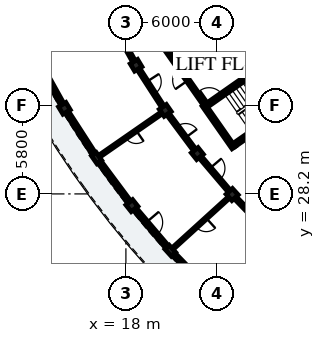
"""IFC4 building model, lengths in metres.
Left out: names, types, materials, properties, quantities, classifications, styles, units other than length and angle.
Written with IfcOpenShell. Run it as: python <this file> out.ifc"""

import sys

from ifc_helpers import new_model, si_unit, direction, frame, frame_2d, origin, origin_2d, place, context, subcontext, project, spatial, rectangle, extrude, element, fill, save


model = new_model("IFC4")
c1 = context("Model", 3, precision=1e-05, world=origin(), true_north=direction((0.0, 1.0)))
c2 = subcontext(c1, "Body", "Model", "MODEL_VIEW")
j1 = project(units=[si_unit("LENGTHUNIT", "METRE"), si_unit("PLANEANGLEUNIT", "RADIAN")], contexts=[c1])
p1 = place(None, origin())
s1 = spatial("IfcSite", under=j1, at=p1, CompositionType="ELEMENT")
p2 = place(p1, origin())
s2 = spatial("IfcBuilding", under=s1, at=p2, CompositionType="ELEMENT")
p3 = place(p2, frame((0.0, 0.0, 15.56)))
s3 = spatial("IfcBuildingStorey", under=s2, at=p3, CompositionType="ELEMENT", Elevation=15.56)
p4 = place(p3, frame((25.114, 31.414, 0.0), z_axis=(0.0, 0.0, 1.0), x_axis=(0.819141541656, 0.573591435374, 0.0)))
e1 = element("IfcWall", 1, at=p4, inside=s3, PredefinedType="SHEAR", context=c2, shape_type="SweptSolid", body=[
    extrude(rectangle(XDim=6.6, YDim=0.25, at=frame_2d((3.3, 0.0))), origin(), (0.0, 0.0, 1.0), 3.11),
])
p5 = place(p3, frame((25.083, 31.24, 0.0), z_axis=(0.0, 0.0, 1.0), x_axis=(-0.573582112484, 0.819148069789, 0.0)))
e2 = element("IfcWall", 2, at=p5, inside=s3, PredefinedType="SHEAR", context=c2, shape_type="SweptSolid", body=[
    extrude(rectangle(XDim=3.42, YDim=0.25, at=frame_2d((1.71, 0.0))), origin(), (0.0, 0.0, 1.0), 3.11),
])
p6 = place(p3, frame((23.296, 34.01, 0.0), z_axis=(0.0, 0.0, 1.0), x_axis=(0.819153711596, 0.573574055182, 0.0)))
e3 = element("IfcWall", 3, at=p6, inside=s3, PredefinedType="SHEAR", context=c2, shape_type="SweptSolid", body=[
    extrude(rectangle(XDim=6.6, YDim=0.25, at=frame_2d((3.3, 0.0))), origin(), (0.0, 0.0, 1.0), 3.11),
])
p7 = place(p6, frame((0.22, 0.0, 0.0)))
e4 = element("IfcOpeningElement", 4, at=p7, cuts=e3, PredefinedType="OPENING", context=c2, shape_type="SweptSolid", body=[
    extrude(rectangle(XDim=1.05, YDim=2.15, at=frame_2d((0.525, 1.075))), frame((0.0, 0.135, 0.0), z_axis=(0.0, -1.0, 0.0), x_axis=(1.0, 0.0, 0.0)), (0.0, 0.0, 1.0), 0.27),
])
p8 = place(p3, frame((26.169, 36.419, 0.0), z_axis=(0.0, 0.0, 1.0), x_axis=(-0.573582966431, 0.819147471839, 0.0)))
e5 = element("IfcWall", 5, at=p8, inside=s3, PredefinedType="SHEAR", context=c2, shape_type="SweptSolid", body=[
    extrude(rectangle(XDim=3.26, YDim=0.23, at=frame_2d((1.63, 0.0))), origin(), (0.0, 0.0, 1.0), 3.11),
])
p9 = place(p8, frame((0.9, 0.0, 0.0)))
e6 = element("IfcOpeningElement", 6, at=p9, cuts=e5, PredefinedType="OPENING", context=c2, shape_type="SweptSolid", body=[
    extrude(rectangle(XDim=1.1, YDim=2.15, at=frame_2d((0.55, 1.075))), frame((0.0, 0.125, 0.0), z_axis=(0.0, -1.0, 0.0), x_axis=(1.0, 0.0, 0.0)), (0.0, 0.0, 1.0), 0.25),
])
for number, where, z_axis, x_axis in (
    (7, (18.67, 36.662, 0.0), (0.0, 0.0, 1.0), (-0.857, -0.515, 0.0)),
    (8, (13.956, 33.83, 0.0), (0.0, 0.0, 1.0), (-0.857, -0.515, 0.0)),
    (9, (20.59, 33.692, 0.0), (0.0, 0.0, 1.0), (-0.822, -0.57, 0.0)),
):
    element("IfcColumn", number, at=place(p3, frame(where, z_axis=z_axis, x_axis=x_axis)), inside=s3, PredefinedType="COLUMN", context=c2, shape_type="SweptSolid", body=[
        extrude(rectangle(XDim=0.56, YDim=0.56, at=origin_2d()), origin(), (0.0, 0.0, 1.0), 3.11),
    ])
p10 = place(p3, frame((16.071, 30.557, 0.0), z_axis=(0.0, 0.0, 1.0), x_axis=(-0.821646937942, -0.569996762596, 0.0)))
e10 = element("IfcColumn", 10, at=p10, inside=s3, PredefinedType="PILASTER", context=c2, shape_type="SweptSolid", body=[
    extrude(rectangle(XDim=0.38, YDim=0.62, at=origin_2d()), origin(), (0.0, 0.0, 1.0), 3.11),
])
for number, where, z_axis, x_axis in (
    (11, (22.7, 30.853, 0.0), (0.0, 0.0, 1.0), (-0.783, -0.623, 0.0)),
    (12, (18.396, 27.429, 0.0), (0.0, 0.0, 1.0), (-0.783, -0.623, 0.0)),
    (13, (24.991, 28.159, 0.0), (0.0, 0.0, 1.0), (-0.74, -0.672, 0.0)),
):
    element("IfcColumn", number, at=place(p3, frame(where, z_axis=z_axis, x_axis=x_axis)), inside=s3, PredefinedType="COLUMN", context=c2, shape_type="SweptSolid", body=[
        extrude(rectangle(XDim=0.56, YDim=0.56, at=origin_2d()), origin(), (0.0, 0.0, 1.0), 3.11),
    ])
p11 = place(p3, frame((20.92, 24.46, 0.0), z_axis=(0.0, 0.0, 1.0), x_axis=(-0.740218127487, -0.672366807435, 0.0)))
e14 = element("IfcColumn", 14, at=p11, inside=s3, PredefinedType="PILASTER", context=c2, shape_type="SweptSolid", body=[
    extrude(rectangle(XDim=0.38, YDim=0.62, at=origin_2d()), origin(), (0.0, 0.0, 1.0), 3.11),
])
p12 = place(p3, frame((12.137, 37.094, 0.0), z_axis=(0.0, 0.0, 1.0), x_axis=(0.486706738221, -0.87356542455, 0.0)))
e15 = element("IfcWall", 15, at=p12, inside=s3, PredefinedType="SOLIDWALL", context=c2, shape_type="SweptSolid", body=[
    extrude(rectangle(XDim=3.487, YDim=0.245, at=frame_2d((1.743, 0.0))), origin(), (0.0, 0.0, 1.0), 2.355),
])
p13 = place(p12, frame((1.104, 0.0, 0.55)))
e16 = element("IfcOpeningElement", 16, at=p13, cuts=e15, PredefinedType="OPENING", context=c2, shape_type="SweptSolid", body=[
    extrude(rectangle(XDim=1.28, YDim=1.56, at=frame_2d((0.64, 0.78))), frame((0.0, 0.133, 0.0), z_axis=(0.0, -1.0, 0.0), x_axis=(1.0, 0.0, 0.0)), (0.0, 0.0, 1.0), 0.265),
])
p14 = place(p3, frame((14.091, 33.62, 0.0), z_axis=(0.0, 0.0, 1.0), x_axis=(0.542833164741, -0.839840553472, 0.0)))
e17 = element("IfcWall", 17, at=p14, inside=s3, PredefinedType="SOLIDWALL", context=c2, shape_type="SweptSolid", body=[
    extrude(rectangle(XDim=3.487, YDim=0.245, at=frame_2d((1.743, 0.0))), origin(), (0.0, 0.0, 1.0), 2.355),
])
p15 = place(p14, frame((1.043, 0.0, 0.35)))
e18 = element("IfcOpeningElement", 18, at=p15, cuts=e17, PredefinedType="OPENING", context=c2, shape_type="SweptSolid", body=[
    extrude(rectangle(XDim=1.4, YDim=1.635, at=frame_2d((0.7, 0.817))), frame((0.0, 0.133, 0.0), z_axis=(0.0, -1.0, 0.0), x_axis=(1.0, 0.0, 0.0)), (0.0, 0.0, 1.0), 0.265),
])
p16 = place(p3, frame((16.166, 30.428, 0.0), z_axis=(0.0, 0.0, 1.0), x_axis=(0.596611432616, -0.802530247699, 0.0)))
e19 = element("IfcWall", 19, at=p16, inside=s3, PredefinedType="SOLIDWALL", context=c2, shape_type="SweptSolid", body=[
    extrude(rectangle(XDim=3.487, YDim=0.245, at=frame_2d((1.743, 0.0))), origin(), (0.0, 0.0, 1.0), 2.355),
])
p17 = place(p16, frame((0.983, 0.0, 0.55)))
e20 = element("IfcOpeningElement", 20, at=p17, cuts=e19, PredefinedType="OPENING", context=c2, shape_type="SweptSolid", body=[
    extrude(rectangle(XDim=1.52, YDim=1.485, at=frame_2d((0.76, 0.743))), frame((0.0, 0.133, 0.0), z_axis=(0.0, -1.0, 0.0), x_axis=(1.0, 0.0, 0.0)), (0.0, 0.0, 1.0), 0.265),
])
p18 = place(p3, frame((18.558, 27.239, 0.0), z_axis=(0.0, 0.0, 1.0), x_axis=(0.647811002696, -0.761801092665, 0.0)))
e21 = element("IfcWall", 21, at=p18, inside=s3, PredefinedType="SOLIDWALL", context=c2, shape_type="SweptSolid", body=[
    extrude(rectangle(XDim=3.487, YDim=0.245, at=frame_2d((1.743, 0.0))), origin(), (0.0, 0.0, 1.0), 2.355),
])
p19 = place(p18, frame((1.203, 0.0, 0.0)))
e22 = element("IfcOpeningElement", 22, at=p19, cuts=e21, PredefinedType="OPENING", context=c2, shape_type="SweptSolid", body=[
    extrude(rectangle(XDim=1.08, YDim=2.15, at=frame_2d((0.54, 1.075))), frame((0.0, 0.133, 0.0), z_axis=(0.0, -1.0, 0.0), x_axis=(1.0, 0.0, 0.0)), (0.0, 0.0, 1.0), 0.265),
])
p20 = place(p3, frame((21.031, 24.346, 0.0), z_axis=(0.0, 0.0, 1.0), x_axis=(0.696205978342, -0.717842068788, 0.0)))
e23 = element("IfcWall", 23, at=p20, inside=s3, PredefinedType="SOLIDWALL", context=c2, shape_type="SweptSolid", body=[
    extrude(rectangle(XDim=3.487, YDim=0.245, at=frame_2d((1.743, 0.0))), origin(), (0.0, 0.0, 1.0), 2.355),
])
p21 = place(p20, frame((0.863, 0.0, 0.35)))
e24 = element("IfcOpeningElement", 24, at=p21, cuts=e23, PredefinedType="OPENING", context=c2, shape_type="SweptSolid", body=[
    extrude(rectangle(XDim=1.76, YDim=1.635, at=frame_2d((0.88, 0.817))), frame((0.0, 0.133, 0.0), z_axis=(0.0, -1.0, 0.0), x_axis=(1.0, 0.0, 0.0)), (0.0, 0.0, 1.0), 0.265),
])
p22 = place(p3, frame((23.195, 34.068, 0.0), z_axis=(0.0, 0.0, 1.0), x_axis=(-0.573572687386, 0.819154669329, 0.0)))
e25 = element("IfcWall", 25, at=p22, inside=s3, PredefinedType="PARTITIONING", context=c2, shape_type="SweptSolid", body=[
    extrude(rectangle(XDim=4.9, YDim=0.22, at=frame_2d((2.45, 0.0))), origin(), (0.0, 0.0, 1.0), 2.34),
])
p23 = place(p22, frame((1.95, 0.0, 0.0)))
e26 = element("IfcOpeningElement", 26, at=p23, cuts=e25, PredefinedType="OPENING", context=c2, shape_type="SweptSolid", body=[
    extrude(rectangle(XDim=1.0, YDim=2.15, at=frame_2d((0.5, 1.075))), frame((0.0, 0.12, 0.0), z_axis=(0.0, -1.0, 0.0), x_axis=(1.0, 0.0, 0.0)), (0.0, 0.0, 1.0), 0.24),
])
p24 = place(p3, frame((16.593, 39.569, 0.0), z_axis=(0.0, 0.0, 1.0), x_axis=(-0.889013002038, -0.457881952262, 0.0)))
e27 = element("IfcWall", 27, at=p24, inside=s3, PredefinedType="PARTITIONING", context=c2, shape_type="SweptSolid", body=[
    extrude(rectangle(XDim=4.7, YDim=0.125, at=frame_2d((2.35, 0.0))), origin(), (0.0, 0.0, 1.0), 2.37),
])
p25 = place(p24, frame((1.895, 0.0, 0.0)))
e28 = element("IfcOpeningElement", 28, at=p25, cuts=e27, PredefinedType="OPENING", context=c2, shape_type="SweptSolid", body=[
    extrude(rectangle(XDim=0.91, YDim=2.1, at=frame_2d((0.455, 1.05))), frame((0.0, 0.073, 0.0), z_axis=(0.0, -1.0, 0.0), x_axis=(1.0, 0.0, 0.0)), (0.0, 0.0, 1.0), 0.145),
])
p26 = place(p3, frame((17.119, 39.446, 0.0), z_axis=(0.0, 0.0, 1.0), x_axis=(0.48673124079, -0.8735517725, 0.0)))
e29 = element("IfcWall", 29, at=p26, inside=s3, PredefinedType="PARTITIONING", context=c2, shape_type="SweptSolid", body=[
    extrude(rectangle(XDim=2.837, YDim=0.195, at=frame_2d((1.418, 0.0))), origin(), (0.0, 0.0, 1.0), 2.37),
])
p27 = place(p26, frame((0.934, 0.0, 0.0)))
e30 = element("IfcOpeningElement", 30, at=p27, cuts=e29, PredefinedType="OPENING", context=c2, shape_type="SweptSolid", body=[
    extrude(rectangle(XDim=0.97, YDim=2.15, at=frame_2d((0.485, 1.075))), frame((0.0, 0.107, 0.0), z_axis=(0.0, -1.0, 0.0), x_axis=(1.0, 0.0, 0.0)), (0.0, 0.0, 1.0), 0.215),
])
p28 = place(p3, frame((18.86, 36.368, 0.0), z_axis=(0.0, 0.0, 1.0), x_axis=(0.542787304957, -0.83987019329, 0.0)))
e31 = element("IfcWall", 31, at=p28, inside=s3, PredefinedType="PARTITIONING", context=c2, shape_type="SweptSolid", body=[
    extrude(rectangle(XDim=2.837, YDim=0.195, at=frame_2d((1.418, 0.0))), origin(), (0.0, 0.0, 1.0), 2.37),
])
p29 = place(p28, frame((0.944, 0.0, 0.0)))
e32 = element("IfcOpeningElement", 32, at=p29, cuts=e31, PredefinedType="OPENING", context=c2, shape_type="SweptSolid", body=[
    extrude(rectangle(XDim=0.95, YDim=2.13, at=frame_2d((0.475, 1.065))), frame((0.0, 0.107, 0.0), z_axis=(0.0, -1.0, 0.0), x_axis=(1.0, 0.0, 0.0)), (0.0, 0.0, 1.0), 0.215),
])
p30 = place(p3, frame((20.261, 33.464, 0.0), z_axis=(0.0, 0.0, 1.0), x_axis=(-0.821638260647, -0.570009270663, 0.0)))
e33 = element("IfcWall", 33, at=p30, inside=s3, PredefinedType="PLUMBINGWALL", context=c2, shape_type="SweptSolid", body=[
    extrude(rectangle(XDim=4.7, YDim=0.14, at=frame_2d((2.35, 0.0))), origin(), (0.0, 0.0, 1.0), 2.37),
])
p31 = place(p30, frame((1.925, 0.0, 0.0)))
e34 = element("IfcOpeningElement", 34, at=p31, cuts=e33, PredefinedType="OPENING", context=c2, shape_type="SweptSolid", body=[
    extrude(rectangle(XDim=0.85, YDim=2.05, at=frame_2d((0.425, 1.025))), frame((0.0, 0.08, 0.0), z_axis=(0.0, -1.0, 0.0), x_axis=(1.0, 0.0, 0.0)), (0.0, 0.0, 1.0), 0.16),
])
p32 = place(p3, frame((20.799, 33.411, 0.0), z_axis=(0.0, 0.0, 1.0), x_axis=(0.596552136601, -0.802574325727, 0.0)))
e35 = element("IfcWall", 35, at=p32, inside=s3, PredefinedType="PARTITIONING", context=c2, shape_type="SweptSolid", body=[
    extrude(rectangle(XDim=2.837, YDim=0.195, at=frame_2d((1.418, 0.0))), origin(), (0.0, 0.0, 1.0), 2.37),
])
p33 = place(p32, frame((0.954, 0.0, 0.0)))
e36 = element("IfcOpeningElement", 36, at=p33, cuts=e35, PredefinedType="OPENING", context=c2, shape_type="SweptSolid", body=[
    extrude(rectangle(XDim=0.93, YDim=2.12, at=frame_2d((0.465, 1.06))), frame((0.0, 0.107, 0.0), z_axis=(0.0, -1.0, 0.0), x_axis=(1.0, 0.0, 0.0)), (0.0, 0.0, 1.0), 0.215),
])
p34 = place(p3, frame((22.927, 30.586, 0.0), z_axis=(0.0, 0.0, 1.0), x_axis=(0.64778830669, -0.761820392032, 0.0)))
e37 = element("IfcWall", 37, at=p34, inside=s3, PredefinedType="PARTITIONING", context=c2, shape_type="SweptSolid", body=[
    extrude(rectangle(XDim=2.837, YDim=0.195, at=frame_2d((1.418, 0.0))), origin(), (0.0, 0.0, 1.0), 2.37),
])
p35 = place(p34, frame((0.924, 0.0, 0.0)))
e38 = element("IfcOpeningElement", 38, at=p35, cuts=e37, PredefinedType="OPENING", context=c2, shape_type="SweptSolid", body=[
    extrude(rectangle(XDim=0.99, YDim=2.16, at=frame_2d((0.495, 1.08))), frame((0.0, 0.107, 0.0), z_axis=(0.0, -1.0, 0.0), x_axis=(1.0, 0.0, 0.0)), (0.0, 0.0, 1.0), 0.215),
])
p36 = place(p3, frame((24.695, 27.89, 0.0), z_axis=(0.0, 0.0, 1.0), x_axis=(-0.740212663782, -0.672372822456, 0.0)))
e39 = element("IfcWall", 39, at=p36, inside=s3, PredefinedType="PARTITIONING", context=c2, shape_type="SweptSolid", body=[
    extrude(rectangle(XDim=4.7, YDim=0.125, at=frame_2d((2.35, 0.0))), origin(), (0.0, 0.0, 1.0), 2.37),
])
p37 = place(p36, frame((1.905, 0.0, 0.0)))
e40 = element("IfcOpeningElement", 40, at=p37, cuts=e39, PredefinedType="OPENING", context=c2, shape_type="SweptSolid", body=[
    extrude(rectangle(XDim=0.89, YDim=2.1, at=frame_2d((0.445, 1.05))), frame((0.0, 0.073, 0.0), z_axis=(0.0, -1.0, 0.0), x_axis=(1.0, 0.0, 0.0)), (0.0, 0.0, 1.0), 0.145),
])
p38 = place(p3, frame((25.235, 27.907, 0.0), z_axis=(0.0, 0.0, 1.0), x_axis=(0.696223786753, -0.717824796701, 0.0)))
e41 = element("IfcWall", 41, at=p38, inside=s3, PredefinedType="PARTITIONING", context=c2, shape_type="SweptSolid", body=[
    extrude(rectangle(XDim=2.837, YDim=0.195, at=frame_2d((1.418, 0.0))), origin(), (0.0, 0.0, 1.0), 2.37),
])
p39 = place(p38, frame((0.934, 0.0, 0.0)))
e42 = element("IfcOpeningElement", 42, at=p39, cuts=e41, PredefinedType="OPENING", context=c2, shape_type="SweptSolid", body=[
    extrude(rectangle(XDim=0.97, YDim=2.15, at=frame_2d((0.485, 1.075))), frame((0.0, 0.107, 0.0), z_axis=(0.0, -1.0, 0.0), x_axis=(1.0, 0.0, 0.0)), (0.0, 0.0, 1.0), 0.215),
])
p40 = place(p13, origin())
e43 = element("IfcWindow", 43, at=p40, inside=s3, PartitioningType="SINGLE_PANEL", PredefinedType="WINDOW", context=c2, shape_type="SweptSolid", body=[
    extrude(rectangle(XDim=1.28, YDim=1.56, at=frame_2d((0.64, 0.78))), frame((0.0, 0.03, 0.0), z_axis=(0.0, -1.0, 0.0), x_axis=(1.0, 0.0, 0.0)), (0.0, 0.0, 1.0), 0.06),
])
fill(e16, e43)
p41 = place(p15, origin())
e44 = element("IfcWindow", 44, at=p41, inside=s3, PartitioningType="SINGLE_PANEL", PredefinedType="WINDOW", context=c2, shape_type="SweptSolid", body=[
    extrude(rectangle(XDim=1.4, YDim=1.635, at=frame_2d((0.7, 0.817))), frame((0.0, 0.03, 0.0), z_axis=(0.0, -1.0, 0.0), x_axis=(1.0, 0.0, 0.0)), (0.0, 0.0, 1.0), 0.06),
])
fill(e18, e44)
p42 = place(p17, origin())
e45 = element("IfcWindow", 45, at=p42, inside=s3, PartitioningType="SINGLE_PANEL", PredefinedType="WINDOW", context=c2, shape_type="SweptSolid", body=[
    extrude(rectangle(XDim=1.52, YDim=1.485, at=frame_2d((0.76, 0.743))), frame((0.0, 0.03, 0.0), z_axis=(0.0, -1.0, 0.0), x_axis=(1.0, 0.0, 0.0)), (0.0, 0.0, 1.0), 0.06),
])
fill(e20, e45)
p43 = place(p19, origin())
e46 = element("IfcDoor", 46, at=p43, inside=s3, OperationType="SINGLE_SWING_LEFT", PredefinedType="DOOR", context=c2, shape_type="SweptSolid", body=[
    extrude(rectangle(XDim=1.08, YDim=2.15, at=frame_2d((0.54, 1.075))), frame((0.0, 0.025, 0.0), z_axis=(0.0, -1.0, 0.0), x_axis=(1.0, 0.0, 0.0)), (0.0, 0.0, 1.0), 0.05),
])
fill(e22, e46)
p44 = place(p21, origin())
e47 = element("IfcWindow", 47, at=p44, inside=s3, PartitioningType="SINGLE_PANEL", PredefinedType="WINDOW", context=c2, shape_type="SweptSolid", body=[
    extrude(rectangle(XDim=1.76, YDim=1.635, at=frame_2d((0.88, 0.817))), frame((0.0, 0.03, 0.0), z_axis=(0.0, -1.0, 0.0), x_axis=(1.0, 0.0, 0.0)), (0.0, 0.0, 1.0), 0.06),
])
fill(e24, e47)
p45 = place(p7, origin())
e48 = element("IfcDoor", 48, at=p45, inside=s3, OperationType="SINGLE_SWING_LEFT", PredefinedType="DOOR", context=c2, shape_type="SweptSolid", body=[
    extrude(rectangle(XDim=1.05, YDim=2.15, at=frame_2d((0.525, 1.075))), frame((0.0, 0.025, 0.0), z_axis=(0.0, -1.0, 0.0), x_axis=(1.0, 0.0, 0.0)), (0.0, 0.0, 1.0), 0.05),
])
fill(e4, e48)
p46 = place(p9, origin())
e49 = element("IfcDoor", 49, at=p46, inside=s3, OperationType="DOUBLE_DOOR_SLIDING", PredefinedType="DOOR", context=c2, shape_type="SweptSolid", body=[
    extrude(rectangle(XDim=1.1, YDim=2.15, at=frame_2d((0.55, 1.075))), frame((0.0, 0.025, 0.0), z_axis=(0.0, -1.0, 0.0), x_axis=(1.0, 0.0, 0.0)), (0.0, 0.0, 1.0), 0.05),
])
fill(e6, e49)
p47 = place(p23, origin())
e50 = element("IfcDoor", 50, at=p47, inside=s3, OperationType="SINGLE_SWING_LEFT", PredefinedType="DOOR", context=c2, shape_type="SweptSolid", body=[
    extrude(rectangle(XDim=1.0, YDim=2.15, at=frame_2d((0.5, 1.075))), frame((0.0, 0.025, 0.0), z_axis=(0.0, -1.0, 0.0), x_axis=(1.0, 0.0, 0.0)), (0.0, 0.0, 1.0), 0.05),
])
fill(e26, e50)
p48 = place(p29, origin())
e51 = element("IfcDoor", 51, at=p48, inside=s3, OperationType="SINGLE_SWING_LEFT", PredefinedType="DOOR", context=c2, shape_type="SweptSolid", body=[
    extrude(rectangle(XDim=0.95, YDim=2.13, at=frame_2d((0.475, 1.065))), frame((0.0, 0.025, 0.0), z_axis=(0.0, -1.0, 0.0), x_axis=(1.0, 0.0, 0.0)), (0.0, 0.0, 1.0), 0.05),
])
fill(e32, e51)
p49 = place(p31, origin())
e52 = element("IfcDoor", 52, at=p49, inside=s3, OperationType="SINGLE_SWING_LEFT", PredefinedType="DOOR", context=c2, shape_type="SweptSolid", body=[
    extrude(rectangle(XDim=0.85, YDim=2.05, at=frame_2d((0.425, 1.025))), frame((0.0, 0.025, 0.0), z_axis=(0.0, -1.0, 0.0), x_axis=(1.0, 0.0, 0.0)), (0.0, 0.0, 1.0), 0.05),
])
fill(e34, e52)
p50 = place(p33, origin())
e53 = element("IfcDoor", 53, at=p50, inside=s3, OperationType="SINGLE_SWING_RIGHT", PredefinedType="DOOR", context=c2, shape_type="SweptSolid", body=[
    extrude(rectangle(XDim=0.93, YDim=2.12, at=frame_2d((0.465, 1.06))), frame((0.0, 0.025, 0.0), z_axis=(0.0, -1.0, 0.0), x_axis=(1.0, 0.0, 0.0)), (0.0, 0.0, 1.0), 0.05),
])
fill(e36, e53)
p51 = place(p35, origin())
e54 = element("IfcDoor", 54, at=p51, inside=s3, OperationType="SINGLE_SWING_LEFT", PredefinedType="DOOR", context=c2, shape_type="SweptSolid", body=[
    extrude(rectangle(XDim=0.99, YDim=2.16, at=frame_2d((0.495, 1.08))), frame((0.0, 0.025, 0.0), z_axis=(0.0, -1.0, 0.0), x_axis=(1.0, 0.0, 0.0)), (0.0, 0.0, 1.0), 0.05),
])
fill(e38, e54)
p52 = place(p37, origin())
e55 = element("IfcDoor", 55, at=p52, inside=s3, OperationType="SINGLE_SWING_LEFT", PredefinedType="DOOR", context=c2, shape_type="SweptSolid", body=[
    extrude(rectangle(XDim=0.89, YDim=2.1, at=frame_2d((0.445, 1.05))), frame((0.0, 0.025, 0.0), z_axis=(0.0, -1.0, 0.0), x_axis=(1.0, 0.0, 0.0)), (0.0, 0.0, 1.0), 0.05),
])
fill(e40, e55)
save(model, sys.argv[1])
